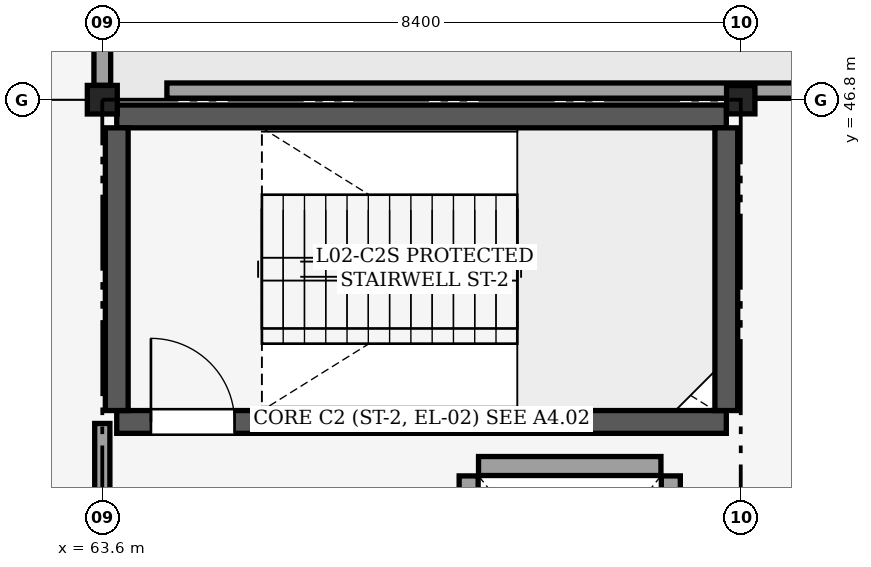
"""IFC4 building model, lengths in metres.
Left out: names, types, materials, properties, quantities, classifications, styles, units other than length and angle.
Written with IfcOpenShell. Run it as: python <this file> out.ifc"""

import sys

from ifc_helpers import new_model, si_unit, direction, frame, frame_2d, origin, origin_2d, place, context, subcontext, project, spatial, rectangle, i_section, extrude, element, fill, save


model = new_model("IFC4")
c1 = context("Model", 3, precision=1e-05, world=origin(), true_north=direction((0.0, 1.0)))
c2 = subcontext(c1, "Body", "Model", "MODEL_VIEW")
j1 = project(units=[si_unit("LENGTHUNIT", "METRE"), si_unit("PLANEANGLEUNIT", "RADIAN")], contexts=[c1])
p1 = place(None, origin())
s1 = spatial("IfcSite", under=j1, at=p1, CompositionType="ELEMENT")
p2 = place(p1, origin())
s2 = spatial("IfcBuilding", under=s1, at=p2, CompositionType="ELEMENT")
p3 = place(p2, frame((0.0, 0.0, 10.2)))
s3 = spatial("IfcBuildingStorey", under=s2, at=p3, CompositionType="ELEMENT", Elevation=10.2)
p4 = place(p3, frame((63.6, 46.8, 0.0), z_axis=(0.0, 0.0, 1.0), x_axis=(1.0, 0.0, 0.0)))
e1 = element("IfcColumn", 1, at=p4, inside=s3, PredefinedType="COLUMN", context=c2, shape_type="SweptSolid", body=[
    extrude(i_section(OverallWidth=0.394, OverallDepth=0.376, WebThickness=0.017, FlangeThickness=0.028, FilletRadius=0.025, at=origin_2d()), origin(), (0.0, 0.0, 1.0), 4.8),
])
p5 = place(p3, frame((72.0, 46.8, 0.0), z_axis=(0.0, 0.0, 1.0), x_axis=(1.0, 0.0, 0.0)))
e2 = element("IfcColumn", 2, at=p5, inside=s3, PredefinedType="COLUMN", context=c2, shape_type="SweptSolid", body=[
    extrude(i_section(OverallWidth=0.373, OverallDepth=0.373, WebThickness=0.016, FlangeThickness=0.026, FilletRadius=0.025, at=origin_2d()), origin(), (0.0, 0.0, 1.0), 4.8),
])
p6 = place(p3, frame((63.6, 54.248, 0.0), z_axis=(0.0, 0.0, 1.0), x_axis=(0.0, -1.0, 0.0)))
e3 = element("IfcWall", 3, at=p6, inside=s3, PredefinedType="SOLIDWALL", context=c2, shape_type="SweptSolid", body=[
    extrude(rectangle(XDim=7.26, YDim=0.22, at=frame_2d((3.63, 0.0))), origin(), (0.0, 0.0, 1.0), 4.007),
])
p7 = place(p6, frame((0.75, 0.0, 0.9)))
e4 = element("IfcOpeningElement", 4, at=p7, cuts=e3, PredefinedType="OPENING", context=c2, shape_type="SweptSolid", body=[
    extrude(rectangle(XDim=1.2, YDim=1.5, at=frame_2d((0.6, 0.75))), frame((0.0, 0.12, 0.0), z_axis=(0.0, -1.0, 0.0), x_axis=(1.0, 0.0, 0.0)), (0.0, 0.0, 1.0), 0.24),
])
p8 = place(p3, frame((64.45, 46.92, 0.0), z_axis=(0.0, 0.0, 1.0), x_axis=(1.0, 0.0, 0.0)))
e5 = element("IfcWall", 5, at=p8, inside=s3, PredefinedType="PARAPET", context=c2, shape_type="SweptSolid", body=[
    extrude(rectangle(XDim=47.5, YDim=0.2, at=frame_2d((23.75, 0.0))), origin(), (0.0, 0.0, 1.0), 0.95),
])
p9 = place(p3, frame((63.79, 42.56, 0.0), z_axis=(0.0, 0.0, 1.0), x_axis=(1.0, 0.0, 0.0)))
e6 = element("IfcWall", 6, at=p9, inside=s3, PredefinedType="SHEAR", context=c2, shape_type="SweptSolid", body=[
    extrude(rectangle(XDim=8.02, YDim=0.3, at=frame_2d((4.01, 0.0))), origin(), (0.0, 0.0, 1.0), 4.56),
])
p10 = place(p9, frame((0.45, 0.0, 0.0)))
e7 = element("IfcOpeningElement", 7, at=p10, cuts=e6, PredefinedType="OPENING", context=c2, shape_type="SweptSolid", body=[
    extrude(rectangle(XDim=1.1, YDim=2.15, at=frame_2d((0.55, 1.075))), frame((0.0, 0.16, 0.0), z_axis=(0.0, -1.0, 0.0), x_axis=(1.0, 0.0, 0.0)), (0.0, 0.0, 1.0), 0.321),
])
p11 = place(p3, frame((63.79, 46.58, 0.0), z_axis=(0.0, 0.0, 1.0), x_axis=(1.0, 0.0, 0.0)))
e8 = element("IfcWall", 8, at=p11, inside=s3, PredefinedType="SHEAR", context=c2, shape_type="SweptSolid", body=[
    extrude(rectangle(XDim=8.02, YDim=0.3, at=frame_2d((4.01, 0.0))), origin(), (0.0, 0.0, 1.0), 4.56),
])
for number, where, z_axis, x_axis in (
    (9, (63.79, 42.71, 0.0), (0.0, 0.0, 1.0), (0.0, 1.0, 0.0)),
    (10, (71.81, 42.71, 0.0), (0.0, 0.0, 1.0), (0.0, 1.0, 0.0)),
):
    element("IfcWall", number, at=place(p3, frame(where, z_axis=z_axis, x_axis=x_axis)), inside=s3, PredefinedType="SHEAR", context=c2, shape_type="SweptSolid", body=[
        extrude(rectangle(XDim=3.72, YDim=0.3, at=frame_2d((1.86, 0.0))), origin(), (0.0, 0.0, 1.0), 4.56),
    ])
p12 = place(p3, frame((71.08, 38.85, 0.0), z_axis=(0.0, 0.0, 1.0), x_axis=(0.0, 1.0, 0.0)))
e11 = element("IfcWall", 11, at=p12, inside=s3, PredefinedType="PARTITIONING", context=c2, shape_type="SweptSolid", body=[
    extrude(rectangle(XDim=3.0, YDim=0.25, at=frame_2d((1.5, 0.0))), origin(), (0.0, 0.0, 1.0), 4.56),
])
p13 = place(p3, frame((68.55, 41.98, 0.0), z_axis=(0.0, 0.0, 1.0), x_axis=(1.0, 0.0, 0.0)))
e12 = element("IfcWall", 12, at=p13, inside=s3, PredefinedType="PARTITIONING", context=c2, shape_type="SweptSolid", body=[
    extrude(rectangle(XDim=2.4, YDim=0.25, at=frame_2d((1.2, 0.0))), origin(), (0.0, 0.0, 1.0), 4.56),
])
p14 = place(p3, frame((68.42, 38.5, 0.0), z_axis=(0.0, 0.0, 1.0), x_axis=(0.0, 1.0, 0.0)))
e13 = element("IfcWall", 13, at=p14, inside=s3, PredefinedType="PARTITIONING", context=c2, shape_type="SweptSolid", body=[
    extrude(rectangle(XDim=3.35, YDim=0.25, at=frame_2d((1.675, 0.0))), origin(), (0.0, 0.0, 1.0), 4.56),
])
p15 = place(p14, frame((0.85, 0.0, 0.0)))
e14 = element("IfcOpeningElement", 14, at=p15, cuts=e13, PredefinedType="OPENING", context=c2, shape_type="SweptSolid", body=[
    extrude(rectangle(XDim=1.25, YDim=2.15, at=frame_2d((0.625, 1.075))), frame((0.0, 0.135, 0.0), z_axis=(0.0, -1.0, 0.0), x_axis=(1.0, 0.0, 0.0)), (0.0, 0.0, 1.0), 0.271),
])
p16 = place(p3, frame((63.6, 38.62, 0.0), z_axis=(0.0, 0.0, 1.0), x_axis=(0.0, 1.0, 0.0)))
e15 = element("IfcWall", 15, at=p16, inside=s3, PredefinedType="PARTITIONING", context=c2, shape_type="SweptSolid", body=[
    extrude(rectangle(XDim=3.92, YDim=0.2, at=frame_2d((1.96, 0.0))), origin(), (0.0, 0.0, 1.0), 3.684),
])
p17 = place(p10, origin())
e16 = element("IfcDoor", 16, at=p17, inside=s3, OperationType="SINGLE_SWING_LEFT", PredefinedType="DOOR", context=c2, shape_type="SweptSolid", body=[
    extrude(rectangle(XDim=1.1, YDim=2.15, at=frame_2d((0.55, 1.075))), frame((0.0, 0.025, 0.0), z_axis=(0.0, -1.0, 0.0), x_axis=(1.0, 0.0, 0.0)), (0.0, 0.0, 1.0), 0.05),
])
fill(e7, e16)
save(model, sys.argv[1])
